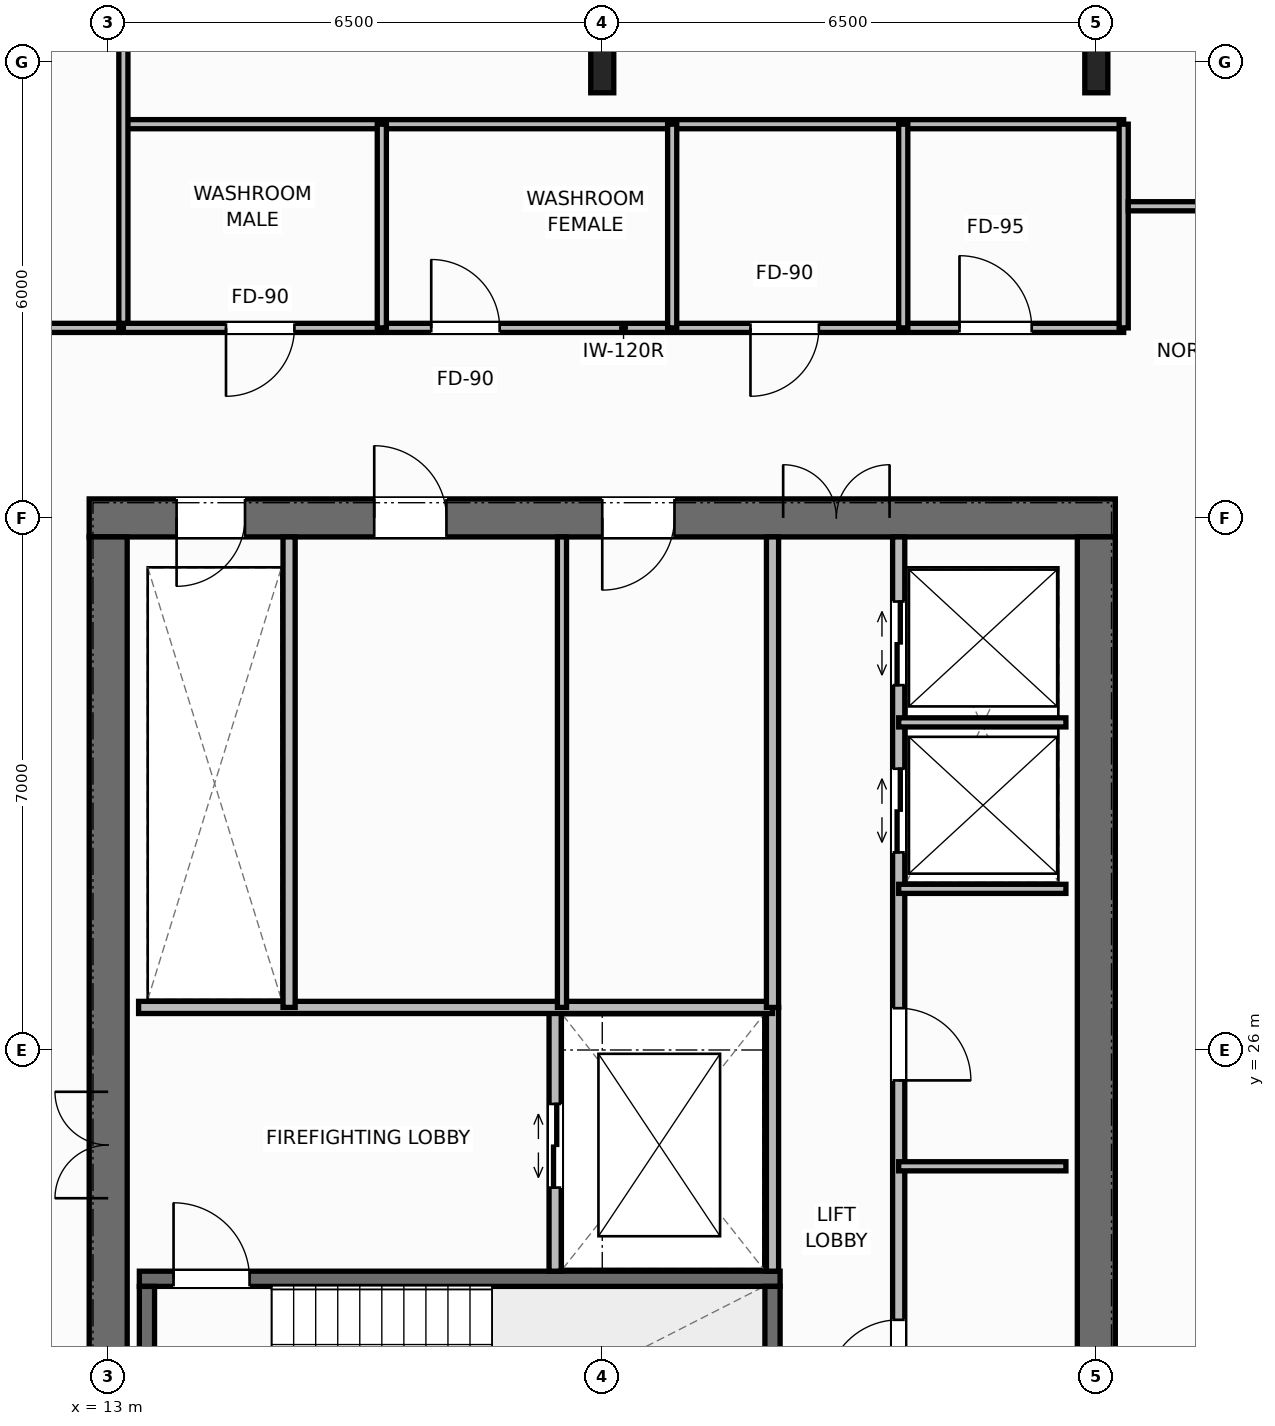
"""IFC4 building model, lengths in metres.
Left out: names, types, materials, properties, quantities, classifications, styles, units other than length and angle.
Written with IfcOpenShell. Run it as: python <this file> out.ifc"""

import sys

from ifc_helpers import new_model, si_unit, direction, frame, frame_2d, origin, origin_2d, place, context, subcontext, project, spatial, rectangle, i_section, extrude, element, fill, save


model = new_model("IFC4")
c1 = context("Model", 3, precision=1e-05, world=origin(), true_north=direction((0.0, 1.0)))
c2 = subcontext(c1, "Body", "Model", "MODEL_VIEW")
j1 = project(units=[si_unit("LENGTHUNIT", "METRE"), si_unit("PLANEANGLEUNIT", "RADIAN")], contexts=[c1])
p1 = place(None, origin())
s1 = spatial("IfcSite", under=j1, at=p1, CompositionType="ELEMENT")
p2 = place(p1, origin())
s2 = spatial("IfcBuilding", under=s1, at=p2, CompositionType="ELEMENT")
p3 = place(p2, frame((0.0, 0.0, 225.2)))
s3 = spatial("IfcBuildingStorey", under=s2, at=p3, CompositionType="ELEMENT", Elevation=225.2)
p4 = place(p3, frame((12.75, 33.0, 0.0), z_axis=(0.0, 0.0, 1.0), x_axis=(1.0, 0.0, 0.0)))
e1 = element("IfcWall", 1, at=p4, inside=s3, PredefinedType="SHEAR", context=c2, shape_type="SweptSolid", body=[
    extrude(rectangle(XDim=13.5, YDim=0.5, at=frame_2d((6.75, 0.0))), origin(), (0.0, 0.0, 1.0), 3.8),
])
p5 = place(p4, frame((1.15, 0.0, 0.0)))
e2 = element("IfcOpeningElement", 2, at=p5, cuts=e1, PredefinedType="OPENING", context=c2, shape_type="SweptSolid", body=[
    extrude(rectangle(XDim=0.9, YDim=2.15, at=frame_2d((0.45, 1.075))), frame((0.0, 0.26, 0.0), z_axis=(0.0, -1.0, 0.0), x_axis=(1.0, 0.0, 0.0)), (0.0, 0.0, 1.0), 0.52),
])
p6 = place(p4, frame((3.75, 0.0, 0.0)))
e3 = element("IfcOpeningElement", 3, at=p6, cuts=e1, PredefinedType="OPENING", context=c2, shape_type="SweptSolid", body=[
    extrude(rectangle(XDim=0.95, YDim=2.15, at=frame_2d((0.475, 1.075))), frame((0.0, 0.26, 0.0), z_axis=(0.0, -1.0, 0.0), x_axis=(1.0, 0.0, 0.0)), (0.0, 0.0, 1.0), 0.52),
])
p7 = place(p4, frame((6.75, 0.0, 0.0)))
e4 = element("IfcOpeningElement", 4, at=p7, cuts=e1, PredefinedType="OPENING", context=c2, shape_type="SweptSolid", body=[
    extrude(rectangle(XDim=0.95, YDim=2.15, at=frame_2d((0.475, 1.075))), frame((0.0, 0.26, 0.0), z_axis=(0.0, -1.0, 0.0), x_axis=(1.0, 0.0, 0.0)), (0.0, 0.0, 1.0), 0.52),
])
p8 = place(p4, frame((9.13, 0.0, 0.0)))
e5 = element("IfcOpeningElement", 5, at=p8, cuts=e1, PredefinedType="OPENING", context=c2, shape_type="SweptSolid", body=[
    extrude(rectangle(XDim=1.4, YDim=2.2, at=frame_2d((0.7, 1.1))), frame((0.0, 0.26, 0.0), z_axis=(0.0, -1.0, 0.0), x_axis=(1.0, 0.0, 0.0)), (0.0, 0.0, 1.0), 0.52),
])
p9 = place(p3, frame((13.0, 19.25, 0.0), z_axis=(0.0, 0.0, 1.0), x_axis=(0.0, 1.0, 0.0)))
e6 = element("IfcWall", 6, at=p9, inside=s3, PredefinedType="SHEAR", context=c2, shape_type="SweptSolid", body=[
    extrude(rectangle(XDim=13.5, YDim=0.5, at=frame_2d((6.75, 0.0))), origin(), (0.0, 0.0, 1.0), 3.8),
])
p10 = place(p9, frame((4.8, 0.0, 0.0)))
e7 = element("IfcOpeningElement", 7, at=p10, cuts=e6, PredefinedType="OPENING", context=c2, shape_type="SweptSolid", body=[
    extrude(rectangle(XDim=1.4, YDim=2.2, at=frame_2d((0.7, 1.1))), frame((0.0, 0.26, 0.0), z_axis=(0.0, -1.0, 0.0), x_axis=(1.0, 0.0, 0.0)), (0.0, 0.0, 1.0), 0.52),
])
p11 = place(p3, frame((26.0, 19.25, 0.0), z_axis=(0.0, 0.0, 1.0), x_axis=(0.0, 1.0, 0.0)))
e8 = element("IfcWall", 8, at=p11, inside=s3, PredefinedType="SHEAR", context=c2, shape_type="SweptSolid", body=[
    extrude(rectangle(XDim=13.5, YDim=0.5, at=frame_2d((6.75, 0.0))), origin(), (0.0, 0.0, 1.0), 3.8),
])
p12 = place(p3, frame((13.41, 22.99, 0.0), z_axis=(0.0, 0.0, 1.0), x_axis=(1.0, 0.0, 0.0)))
e9 = element("IfcWall", 9, at=p12, inside=s3, PredefinedType="SHEAR", context=c2, shape_type="SweptSolid", body=[
    extrude(rectangle(XDim=8.43, YDim=0.2, at=frame_2d((4.215, 0.0))), origin(), (0.0, 0.0, 1.0), 3.8),
])
p13 = place(p12, frame((0.45, 0.0, 0.0)))
e10 = element("IfcOpeningElement", 10, at=p13, cuts=e9, PredefinedType="OPENING", context=c2, shape_type="SweptSolid", body=[
    extrude(rectangle(XDim=1.0, YDim=2.15, at=frame_2d((0.5, 1.075))), frame((0.0, 0.11, 0.0), z_axis=(0.0, -1.0, 0.0), x_axis=(1.0, 0.0, 0.0)), (0.0, 0.0, 1.0), 0.22),
])
for number, where, z_axis, x_axis in (
    (11, (13.51, 19.61, 0.0), (0.0, 0.0, 1.0), (0.0, 1.0, 0.0)),
    (12, (21.74, 19.61, 0.0), (0.0, 0.0, 1.0), (0.0, 1.0, 0.0)),
):
    element("IfcWall", number, at=place(p3, frame(where, z_axis=z_axis, x_axis=x_axis)), inside=s3, PredefinedType="SHEAR", context=c2, shape_type="SweptSolid", body=[
        extrude(rectangle(XDim=3.28, YDim=0.2, at=frame_2d((1.64, 0.0))), origin(), (0.0, 0.0, 1.0), 3.8),
    ])
for number, where, z_axis, x_axis in (
    (13, (19.5, 39.0, 0.0), (0.0, 0.0, 1.0), (1.0, 0.0, 0.0)),
    (14, (26.0, 39.0, 0.0), (0.0, 0.0, 1.0), (1.0, 0.0, 0.0)),
):
    element("IfcColumn", number, at=place(p3, frame(where, z_axis=z_axis, x_axis=x_axis)), inside=s3, PredefinedType="COLUMN", context=c2, shape_type="SweptSolid", body=[
        extrude(i_section(OverallWidth=0.303, OverallDepth=0.814, WebThickness=0.021, FlangeThickness=0.04, at=origin_2d()), origin(), (0.0, 0.0, 1.0), 3.8),
    ])
p14 = place(p3, frame((21.74, 23.09, 0.0), z_axis=(0.0, 0.0, 1.0), x_axis=(0.0, 1.0, 0.0)))
e15 = element("IfcWall", 15, at=p14, inside=s3, PredefinedType="STANDARD", context=c2, shape_type="SweptSolid", body=[
    extrude(rectangle(XDim=3.47, YDim=0.16, at=frame_2d((1.735, 0.0))), origin(), (0.0, 0.0, 1.0), 3.58),
])
p15 = place(p3, frame((18.88, 23.09, 0.0), z_axis=(0.0, 0.0, 1.0), x_axis=(0.0, 1.0, 0.0)))
e16 = element("IfcWall", 16, at=p15, inside=s3, PredefinedType="STANDARD", context=c2, shape_type="SweptSolid", body=[
    extrude(rectangle(XDim=3.47, YDim=0.16, at=frame_2d((1.735, 0.0))), origin(), (0.0, 0.0, 1.0), 3.58),
])
p16 = place(p15, frame((1.1, 0.0, 0.0)))
e17 = element("IfcOpeningElement", 17, at=p16, cuts=e16, PredefinedType="OPENING", context=c2, shape_type="SweptSolid", body=[
    extrude(rectangle(XDim=1.1, YDim=2.2, at=frame_2d((0.55, 1.1))), frame((0.0, 0.09, 0.0), z_axis=(0.0, -1.0, 0.0), x_axis=(1.0, 0.0, 0.0)), (0.0, 0.0, 1.0), 0.18),
])
p17 = place(p3, frame((13.4, 26.56, 0.0), z_axis=(0.0, 0.0, 1.0), x_axis=(1.0, 0.0, 0.0)))
e18 = element("IfcWall", 18, at=p17, inside=s3, PredefinedType="STANDARD", context=c2, shape_type="SweptSolid", body=[
    extrude(rectangle(XDim=8.34, YDim=0.16, at=frame_2d((4.17, 0.0))), origin(), (0.0, 0.0, 1.0), 3.58),
])
p18 = place(p3, frame((15.38, 26.56, 0.0), z_axis=(0.0, 0.0, 1.0), x_axis=(0.0, 1.0, 0.0)))
e19 = element("IfcWall", 19, at=p18, inside=s3, PredefinedType="STANDARD", context=c2, shape_type="SweptSolid", body=[
    extrude(rectangle(XDim=6.19, YDim=0.16, at=frame_2d((3.095, 0.0))), origin(), (0.0, 0.0, 1.0), 3.58),
])
p19 = place(p3, frame((18.97, 26.56, 0.0), z_axis=(0.0, 0.0, 1.0), x_axis=(0.0, 1.0, 0.0)))
e20 = element("IfcWall", 20, at=p19, inside=s3, PredefinedType="PARTITIONING", context=c2, shape_type="SweptSolid", body=[
    extrude(rectangle(XDim=6.19, YDim=0.12, at=frame_2d((3.095, 0.0))), origin(), (0.0, 0.0, 1.0), 3.58),
])
p20 = place(p3, frame((21.74, 26.56, 0.0), z_axis=(0.0, 0.0, 1.0), x_axis=(0.0, 1.0, 0.0)))
e21 = element("IfcWall", 21, at=p20, inside=s3, PredefinedType="STANDARD", context=c2, shape_type="SweptSolid", body=[
    extrude(rectangle(XDim=6.19, YDim=0.16, at=frame_2d((3.095, 0.0))), origin(), (0.0, 0.0, 1.0), 3.58),
])
p21 = place(p3, frame((23.4, 19.25, 0.0), z_axis=(0.0, 0.0, 1.0), x_axis=(0.0, 1.0, 0.0)))
e22 = element("IfcWall", 22, at=p21, inside=s3, PredefinedType="STANDARD", context=c2, shape_type="SweptSolid", body=[
    extrude(rectangle(XDim=13.5, YDim=0.16, at=frame_2d((6.75, 0.0))), origin(), (0.0, 0.0, 1.0), 3.58),
])
p22 = place(p21, frame((2.25, 0.0, 0.0)))
e23 = element("IfcOpeningElement", 23, at=p22, cuts=e22, PredefinedType="OPENING", context=c2, shape_type="SweptSolid", body=[
    extrude(rectangle(XDim=0.95, YDim=2.15, at=frame_2d((0.475, 1.075))), frame((0.0, 0.09, 0.0), z_axis=(0.0, -1.0, 0.0), x_axis=(1.0, 0.0, 0.0)), (0.0, 0.0, 1.0), 0.18),
])
p23 = place(p21, frame((6.35, 0.0, 0.0)))
e24 = element("IfcOpeningElement", 24, at=p23, cuts=e22, PredefinedType="OPENING", context=c2, shape_type="SweptSolid", body=[
    extrude(rectangle(XDim=0.95, YDim=2.15, at=frame_2d((0.475, 1.075))), frame((0.0, 0.09, 0.0), z_axis=(0.0, -1.0, 0.0), x_axis=(1.0, 0.0, 0.0)), (0.0, 0.0, 1.0), 0.18),
])
p24 = place(p21, frame((9.35, 0.0, 0.0)))
e25 = element("IfcOpeningElement", 25, at=p24, cuts=e22, PredefinedType="OPENING", context=c2, shape_type="SweptSolid", body=[
    extrude(rectangle(XDim=1.1, YDim=2.2, at=frame_2d((0.55, 1.1))), frame((0.0, 0.09, 0.0), z_axis=(0.0, -1.0, 0.0), x_axis=(1.0, 0.0, 0.0)), (0.0, 0.0, 1.0), 0.18),
])
p25 = place(p21, frame((11.55, 0.0, 0.0)))
e26 = element("IfcOpeningElement", 26, at=p25, cuts=e22, PredefinedType="OPENING", context=c2, shape_type="SweptSolid", body=[
    extrude(rectangle(XDim=1.1, YDim=2.2, at=frame_2d((0.55, 1.1))), frame((0.0, 0.09, 0.0), z_axis=(0.0, -1.0, 0.0), x_axis=(1.0, 0.0, 0.0)), (0.0, 0.0, 1.0), 0.18),
])
for number, where, z_axis, x_axis in (
    (27, (23.4, 24.47, 0.0), (0.0, 0.0, 1.0), (1.0, 0.0, 0.0)),
    (28, (23.4, 28.12, 0.0), (0.0, 0.0, 1.0), (1.0, 0.0, 0.0)),
    (29, (23.4, 30.31, 0.0), (0.0, 0.0, 1.0), (1.0, 0.0, 0.0)),
):
    element("IfcWall", number, at=place(p3, frame(where, z_axis=z_axis, x_axis=x_axis)), inside=s3, PredefinedType="PARTITIONING", context=c2, shape_type="SweptSolid", body=[
        extrude(rectangle(XDim=2.2, YDim=0.12, at=frame_2d((1.1, 0.0))), origin(), (0.0, 0.0, 1.0), 3.58),
    ])
p26 = place(p3, frame((13.2, 35.5, 0.0), z_axis=(0.0, 0.0, 1.0), x_axis=(1.0, 0.0, 0.0)))
e30 = element("IfcWall", 30, at=p26, inside=s3, PredefinedType="PARTITIONING", context=c2, shape_type="SweptSolid", body=[
    extrude(rectangle(XDim=13.16, YDim=0.12, at=frame_2d((6.58, 0.0))), origin(), (0.0, 0.0, 1.0), 3.58),
])
p27 = place(p26, frame((1.35, 0.0, 0.0)))
e31 = element("IfcOpeningElement", 31, at=p27, cuts=e30, PredefinedType="OPENING", context=c2, shape_type="SweptSolid", body=[
    extrude(rectangle(XDim=0.9, YDim=2.15, at=frame_2d((0.45, 1.075))), frame((0.0, 0.07, 0.0), z_axis=(0.0, -1.0, 0.0), x_axis=(1.0, 0.0, 0.0)), (0.0, 0.0, 1.0), 0.14),
])
p28 = place(p26, frame((4.05, 0.0, 0.0)))
e32 = element("IfcOpeningElement", 32, at=p28, cuts=e30, PredefinedType="OPENING", context=c2, shape_type="SweptSolid", body=[
    extrude(rectangle(XDim=0.9, YDim=2.15, at=frame_2d((0.45, 1.075))), frame((0.0, 0.07, 0.0), z_axis=(0.0, -1.0, 0.0), x_axis=(1.0, 0.0, 0.0)), (0.0, 0.0, 1.0), 0.14),
])
p29 = place(p26, frame((8.25, 0.0, 0.0)))
e33 = element("IfcOpeningElement", 33, at=p29, cuts=e30, PredefinedType="OPENING", context=c2, shape_type="SweptSolid", body=[
    extrude(rectangle(XDim=0.9, YDim=2.15, at=frame_2d((0.45, 1.075))), frame((0.0, 0.07, 0.0), z_axis=(0.0, -1.0, 0.0), x_axis=(1.0, 0.0, 0.0)), (0.0, 0.0, 1.0), 0.14),
])
p30 = place(p26, frame((11.0, 0.0, 0.0)))
e34 = element("IfcOpeningElement", 34, at=p30, cuts=e30, PredefinedType="OPENING", context=c2, shape_type="SweptSolid", body=[
    extrude(rectangle(XDim=0.95, YDim=2.15, at=frame_2d((0.475, 1.075))), frame((0.0, 0.07, 0.0), z_axis=(0.0, -1.0, 0.0), x_axis=(1.0, 0.0, 0.0)), (0.0, 0.0, 1.0), 0.14),
])
p31 = place(p3, frame((13.2, 38.18, 0.0), z_axis=(0.0, 0.0, 1.0), x_axis=(1.0, 0.0, 0.0)))
e35 = element("IfcWall", 35, at=p31, inside=s3, PredefinedType="PARTITIONING", context=c2, shape_type="SweptSolid", body=[
    extrude(rectangle(XDim=13.16, YDim=0.12, at=frame_2d((6.58, 0.0))), origin(), (0.0, 0.0, 1.0), 3.58),
])
for number, where, z_axis, x_axis in (
    (36, (16.6, 35.5, 0.0), (0.0, 0.0, 1.0), (0.0, 1.0, 0.0)),
    (37, (20.42, 35.5, 0.0), (0.0, 0.0, 1.0), (0.0, 1.0, 0.0)),
    (38, (23.46, 35.5, 0.0), (0.0, 0.0, 1.0), (0.0, 1.0, 0.0)),
    (39, (26.36, 35.5, 0.0), (0.0, 0.0, 1.0), (0.0, 1.0, 0.0)),
):
    element("IfcWall", number, at=place(p3, frame(where, z_axis=z_axis, x_axis=x_axis)), inside=s3, PredefinedType="PARTITIONING", context=c2, shape_type="SweptSolid", body=[
        extrude(rectangle(XDim=2.68, YDim=0.12, at=frame_2d((1.34, 0.0))), origin(), (0.0, 0.0, 1.0), 3.58),
    ])
p32 = place(p3, frame((13.2, 35.56, 0.0), z_axis=(0.0, 0.0, 1.0), x_axis=(0.0, 1.0, 0.0)))
e40 = element("IfcWall", 40, at=p32, inside=s3, PredefinedType="PARTITIONING", context=c2, shape_type="SweptSolid", body=[
    extrude(rectangle(XDim=11.42, YDim=0.12, at=frame_2d((5.71, 0.0))), origin(), (0.0, 0.0, 1.0), 2.88),
])
p33 = place(p3, frame((5.98, 35.5, 0.0), z_axis=(0.0, 0.0, 1.0), x_axis=(1.0, 0.0, 0.0)))
e41 = element("IfcWall", 41, at=p33, inside=s3, PredefinedType="PARTITIONING", context=c2, shape_type="SweptSolid", body=[
    extrude(rectangle(XDim=7.16, YDim=0.12, at=frame_2d((3.58, 0.0))), origin(), (0.0, 0.0, 1.0), 3.58),
])
p34 = place(p33, frame((4.9, 0.0, 0.0)))
e42 = element("IfcOpeningElement", 42, at=p34, cuts=e41, PredefinedType="OPENING", context=c2, shape_type="SweptSolid", body=[
    extrude(rectangle(XDim=0.95, YDim=2.15, at=frame_2d((0.475, 1.075))), frame((0.0, 0.07, 0.0), z_axis=(0.0, -1.0, 0.0), x_axis=(1.0, 0.0, 0.0)), (0.0, 0.0, 1.0), 0.14),
])
p35 = place(p3, frame((26.42, 37.1, 0.0), z_axis=(0.0, 0.0, 1.0), x_axis=(1.0, 0.0, 0.0)))
e43 = element("IfcWall", 43, at=p35, inside=s3, PredefinedType="PARTITIONING", context=c2, shape_type="SweptSolid", body=[
    extrude(rectangle(XDim=9.32, YDim=0.12, at=frame_2d((4.66, 0.0))), origin(), (0.0, 0.0, 1.0), 3.58),
])
p36 = place(p35, frame((4.185, 0.0, 0.0)))
e44 = element("IfcOpeningElement", 44, at=p36, cuts=e43, PredefinedType="OPENING", context=c2, shape_type="SweptSolid", body=[
    extrude(rectangle(XDim=0.95, YDim=2.15, at=frame_2d((0.475, 1.075))), frame((0.0, 0.07, 0.0), z_axis=(0.0, -1.0, 0.0), x_axis=(1.0, 0.0, 0.0)), (0.0, 0.0, 1.0), 0.14),
])
p37 = place(p13, origin())
e45 = element("IfcDoor", 45, at=p37, inside=s3, OperationType="SINGLE_SWING_LEFT", PredefinedType="DOOR", context=c2, shape_type="SweptSolid", body=[
    extrude(rectangle(XDim=1.0, YDim=2.15, at=frame_2d((0.5, 1.075))), frame((0.0, 0.025, 0.0), z_axis=(0.0, -1.0, 0.0), x_axis=(1.0, 0.0, 0.0)), (0.0, 0.0, 1.0), 0.05),
])
fill(e10, e45)
p38 = place(p10, origin())
e46 = element("IfcDoor", 46, at=p38, inside=s3, OperationType="DOUBLE_DOOR_SINGLE_SWING", PredefinedType="DOOR", context=c2, shape_type="SweptSolid", body=[
    extrude(rectangle(XDim=1.4, YDim=2.2, at=frame_2d((0.7, 1.1))), frame((0.0, 0.025, 0.0), z_axis=(0.0, -1.0, 0.0), x_axis=(1.0, 0.0, 0.0)), (0.0, 0.0, 1.0), 0.05),
])
fill(e7, e46)
p39 = place(p16, origin())
e47 = element("IfcDoor", 47, at=p39, inside=s3, OperationType="DOUBLE_DOOR_SLIDING", PredefinedType="DOOR", context=c2, shape_type="SweptSolid", body=[
    extrude(rectangle(XDim=1.1, YDim=2.2, at=frame_2d((0.55, 1.1))), frame((0.0, 0.025, 0.0), z_axis=(0.0, -1.0, 0.0), x_axis=(1.0, 0.0, 0.0)), (0.0, 0.0, 1.0), 0.05),
])
fill(e17, e47)
p40 = place(p5, origin())
e48 = element("IfcDoor", 48, at=p40, inside=s3, OperationType="SINGLE_SWING_RIGHT", PredefinedType="DOOR", context=c2, shape_type="SweptSolid", body=[
    extrude(rectangle(XDim=0.9, YDim=2.15, at=frame_2d((0.45, 1.075))), frame((0.0, -0.025, 0.0), z_axis=(0.0, -1.0, 0.0), x_axis=(1.0, 0.0, 0.0)), (0.0, 0.0, 1.0), 0.05),
])
fill(e2, e48)
p41 = place(p6, origin())
e49 = element("IfcDoor", 49, at=p41, inside=s3, OperationType="SINGLE_SWING_LEFT", PredefinedType="DOOR", context=c2, shape_type="SweptSolid", body=[
    extrude(rectangle(XDim=0.95, YDim=2.15, at=frame_2d((0.475, 1.075))), frame((0.0, -0.025, 0.0), z_axis=(0.0, -1.0, 0.0), x_axis=(1.0, 0.0, 0.0)), (0.0, 0.0, 1.0), 0.05),
])
fill(e3, e49)
p42 = place(p7, origin())
e50 = element("IfcDoor", 50, at=p42, inside=s3, OperationType="SINGLE_SWING_RIGHT", PredefinedType="DOOR", context=c2, shape_type="SweptSolid", body=[
    extrude(rectangle(XDim=0.95, YDim=2.15, at=frame_2d((0.475, 1.075))), frame((0.0, -0.025, 0.0), z_axis=(0.0, -1.0, 0.0), x_axis=(1.0, 0.0, 0.0)), (0.0, 0.0, 1.0), 0.05),
])
fill(e4, e50)
p43 = place(p8, origin())
e51 = element("IfcDoor", 51, at=p43, inside=s3, OperationType="DOUBLE_DOOR_SINGLE_SWING", PredefinedType="DOOR", context=c2, shape_type="SweptSolid", body=[
    extrude(rectangle(XDim=1.4, YDim=2.2, at=frame_2d((0.7, 1.1))), frame((0.0, -0.025, 0.0), z_axis=(0.0, -1.0, 0.0), x_axis=(1.0, 0.0, 0.0)), (0.0, 0.0, 1.0), 0.05),
])
fill(e5, e51)
p44 = place(p22, origin())
e52 = element("IfcDoor", 52, at=p44, inside=s3, OperationType="SINGLE_SWING_LEFT", PredefinedType="DOOR", context=c2, shape_type="SweptSolid", body=[
    extrude(rectangle(XDim=0.95, YDim=2.15, at=frame_2d((0.475, 1.075))), frame((0.0, 0.025, 0.0), z_axis=(0.0, -1.0, 0.0), x_axis=(1.0, 0.0, 0.0)), (0.0, 0.0, 1.0), 0.05),
])
fill(e23, e52)
p45 = place(p23, origin())
e53 = element("IfcDoor", 53, at=p45, inside=s3, OperationType="SINGLE_SWING_RIGHT", PredefinedType="DOOR", context=c2, shape_type="SweptSolid", body=[
    extrude(rectangle(XDim=0.95, YDim=2.15, at=frame_2d((0.475, 1.075))), frame((0.0, 0.025, 0.0), z_axis=(0.0, -1.0, 0.0), x_axis=(1.0, 0.0, 0.0)), (0.0, 0.0, 1.0), 0.05),
])
fill(e24, e53)
p46 = place(p24, origin())
e54 = element("IfcDoor", 54, at=p46, inside=s3, OperationType="DOUBLE_DOOR_SLIDING", PredefinedType="DOOR", context=c2, shape_type="SweptSolid", body=[
    extrude(rectangle(XDim=1.1, YDim=2.2, at=frame_2d((0.55, 1.1))), frame((0.0, 0.025, 0.0), z_axis=(0.0, -1.0, 0.0), x_axis=(1.0, 0.0, 0.0)), (0.0, 0.0, 1.0), 0.05),
])
fill(e25, e54)
p47 = place(p25, origin())
e55 = element("IfcDoor", 55, at=p47, inside=s3, OperationType="DOUBLE_DOOR_SLIDING", PredefinedType="DOOR", context=c2, shape_type="SweptSolid", body=[
    extrude(rectangle(XDim=1.1, YDim=2.2, at=frame_2d((0.55, 1.1))), frame((0.0, 0.025, 0.0), z_axis=(0.0, -1.0, 0.0), x_axis=(1.0, 0.0, 0.0)), (0.0, 0.0, 1.0), 0.05),
])
fill(e26, e55)
p48 = place(p27, origin())
e56 = element("IfcDoor", 56, at=p48, inside=s3, OperationType="SINGLE_SWING_RIGHT", PredefinedType="DOOR", context=c2, shape_type="SweptSolid", body=[
    extrude(rectangle(XDim=0.9, YDim=2.15, at=frame_2d((0.45, 1.075))), frame((0.0, 0.025, 0.0), z_axis=(0.0, -1.0, 0.0), x_axis=(1.0, 0.0, 0.0)), (0.0, 0.0, 1.0), 0.05),
])
fill(e31, e56)
p49 = place(p28, origin())
e57 = element("IfcDoor", 57, at=p49, inside=s3, OperationType="SINGLE_SWING_LEFT", PredefinedType="DOOR", context=c2, shape_type="SweptSolid", body=[
    extrude(rectangle(XDim=0.9, YDim=2.15, at=frame_2d((0.45, 1.075))), frame((0.0, 0.025, 0.0), z_axis=(0.0, -1.0, 0.0), x_axis=(1.0, 0.0, 0.0)), (0.0, 0.0, 1.0), 0.05),
])
fill(e32, e57)
p50 = place(p29, origin())
e58 = element("IfcDoor", 58, at=p50, inside=s3, OperationType="SINGLE_SWING_RIGHT", PredefinedType="DOOR", context=c2, shape_type="SweptSolid", body=[
    extrude(rectangle(XDim=0.9, YDim=2.15, at=frame_2d((0.45, 1.075))), frame((0.0, 0.025, 0.0), z_axis=(0.0, -1.0, 0.0), x_axis=(1.0, 0.0, 0.0)), (0.0, 0.0, 1.0), 0.05),
])
fill(e33, e58)
p51 = place(p30, origin())
e59 = element("IfcDoor", 59, at=p51, inside=s3, OperationType="SINGLE_SWING_LEFT", PredefinedType="DOOR", context=c2, shape_type="SweptSolid", body=[
    extrude(rectangle(XDim=0.95, YDim=2.15, at=frame_2d((0.475, 1.075))), frame((0.0, 0.025, 0.0), z_axis=(0.0, -1.0, 0.0), x_axis=(1.0, 0.0, 0.0)), (0.0, 0.0, 1.0), 0.05),
])
fill(e34, e59)
save(model, sys.argv[1])
